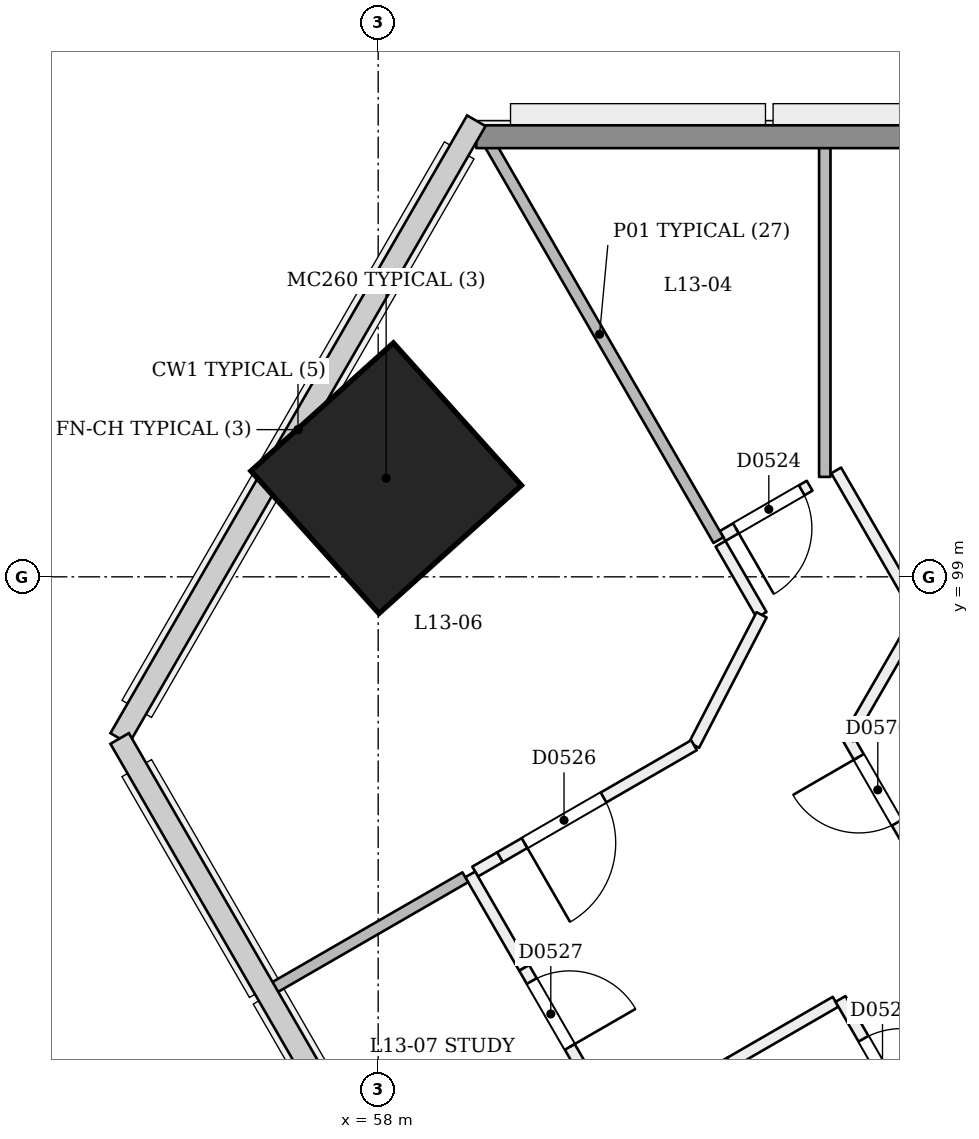
"""IFC4 building model, lengths in metres.
Left out: names, types, materials, properties, quantities, classifications, styles, units other than length and angle.
Written with IfcOpenShell. Run it as: python <this file> out.ifc"""

import sys

from ifc_helpers import new_model, si_unit, direction, frame, frame_2d, origin, origin_2d, place, context, subcontext, project, spatial, rectangle, extrude, element, fill, save


model = new_model("IFC4")
c1 = context("Model", 3, precision=1e-05, world=origin(), true_north=direction((0.0, 1.0)))
c2 = subcontext(c1, "Body", "Model", "MODEL_VIEW")
j1 = project(units=[si_unit("LENGTHUNIT", "METRE"), si_unit("PLANEANGLEUNIT", "RADIAN")], contexts=[c1])
p1 = place(None, origin())
s1 = spatial("IfcSite", under=j1, at=p1, CompositionType="ELEMENT")
p2 = place(p1, origin())
s2 = spatial("IfcBuilding", under=s1, at=p2, CompositionType="ELEMENT")
p3 = place(p2, frame((0.0, 0.0, 55.8)))
s3 = spatial("IfcBuildingStorey", under=s2, at=p3, CompositionType="ELEMENT", Elevation=55.8)
p4 = place(p3, frame((58.071, 100.287, 0.0), z_axis=(0.028403739082, 0.009219352065, 0.999554016126), x_axis=(-0.865127356404, 0.501154864759, 0.019961431043)))
e1 = element("IfcColumn", 1, at=p4, inside=s3, PredefinedType="COLUMN", context=c2, shape_type="SweptSolid", body=[
    extrude(rectangle(XDim=2.52, YDim=2.52, at=origin_2d()), origin(), (0.0, 0.0, 1.0), 3.602),
])
p5 = place(p3, frame((63.676, 100.198, 0.0), z_axis=(0.0, 0.0, 1.0), x_axis=(-0.865994851461, -0.500052914442, 0.0)))
e2 = element("IfcWall", 2, at=p5, inside=s3, PredefinedType="PARTITIONING", context=c2, shape_type="SweptSolid", body=[
    extrude(rectangle(XDim=1.322, YDim=0.15, at=frame_2d((0.661, 0.0))), origin(), (0.0, 0.0, 1.0), 3.1),
])
p6 = place(p5, frame((0.12, 0.0, 0.0)))
e3 = element("IfcOpeningElement", 3, at=p6, cuts=e2, PredefinedType="OPENING", context=c2, shape_type="SweptSolid", body=[
    extrude(rectangle(XDim=1.0, YDim=2.1, at=frame_2d((0.5, 1.05))), frame((0.0, 0.085, 0.0), z_axis=(0.0, -1.0, 0.0), x_axis=(1.0, 0.0, 0.0)), (0.0, 0.0, 1.0), 0.171),
])
p7 = place(p3, frame((62.504, 99.435, 0.0), z_axis=(0.0, 0.0, 1.0), x_axis=(0.499957341738, -0.866050031143, 0.0)))
e4 = element("IfcWall", 4, at=p7, inside=s3, PredefinedType="PARTITIONING", context=c2, shape_type="SweptSolid", body=[
    extrude(rectangle(XDim=1.08, YDim=0.15, at=frame_2d((0.54, 0.0))), origin(), (0.0, 0.0, 1.0), 3.1),
])
p8 = place(p3, frame((63.044, 98.5, 0.0), z_axis=(0.0, 0.0, 1.0), x_axis=(-0.459959252293, -0.887940024005, 0.0)))
e5 = element("IfcWall", 5, at=p8, inside=s3, PredefinedType="PARTITIONING", context=c2, shape_type="SweptSolid", body=[
    extrude(rectangle(XDim=1.932, YDim=0.15, at=frame_2d((0.966, 0.0))), origin(), (0.0, 0.0, 1.0), 3.1),
])
p9 = place(p3, frame((62.155, 96.785, 0.0), z_axis=(0.0, 0.0, 1.0), x_axis=(-0.866033953121, -0.499985191823, 0.0)))
e6 = element("IfcWall", 6, at=p9, inside=s3, PredefinedType="PARTITIONING", context=c2, shape_type="SweptSolid", body=[
    extrude(rectangle(XDim=2.949, YDim=0.15, at=frame_2d((1.475, 0.0))), origin(), (0.0, 0.0, 1.0), 3.1),
])
p10 = place(p9, frame((1.375, 0.0, 0.0)))
e7 = element("IfcOpeningElement", 7, at=p10, cuts=e6, PredefinedType="OPENING", context=c2, shape_type="SweptSolid", body=[
    extrude(rectangle(XDim=1.2, YDim=2.1, at=frame_2d((0.6, 1.05))), frame((0.0, 0.085, 0.0), z_axis=(0.0, -1.0, 0.0), x_axis=(1.0, 0.0, 0.0)), (0.0, 0.0, 1.0), 0.171),
])
p11 = place(p3, frame((59.601, 95.31, 0.0), z_axis=(0.0, 0.0, 1.0), x_axis=(-0.865752432539, -0.500472502294, 0.0)))
e8 = element("IfcWall", 8, at=p11, inside=s3, PredefinedType="PARTITIONING", context=c2, shape_type="SweptSolid", body=[
    extrude(rectangle(XDim=0.376, YDim=0.15, at=frame_2d((0.188, 0.0))), origin(), (0.0, 0.0, 1.0), 2.6),
])
p12 = place(p3, frame((59.211, 95.085, 0.0), z_axis=(0.0, 0.0, 1.0), x_axis=(0.500114325761, -0.865959387713, 0.0)))
e9 = element("IfcWall", 9, at=p12, inside=s3, PredefinedType="PARTITIONING", context=c2, shape_type="SweptSolid", body=[
    extrude(rectangle(XDim=1.42, YDim=0.15, at=frame_2d((0.71, 0.0))), origin(), (0.0, 0.0, 1.0), 2.6),
])
p13 = place(p3, frame((59.921, 93.855, 0.0), z_axis=(0.0, 0.0, 1.0), x_axis=(0.499967270532, -0.866044299327, 0.0)))
e10 = element("IfcWall", 10, at=p13, inside=s3, PredefinedType="PARTITIONING", context=c2, shape_type="SweptSolid", body=[
    extrude(rectangle(XDim=2.36, YDim=0.15, at=frame_2d((1.18, 0.0))), origin(), (0.0, 0.0, 1.0), 3.1),
])
p14 = place(p13, frame((0.2, 0.0, 0.0)))
e11 = element("IfcOpeningElement", 11, at=p14, cuts=e10, PredefinedType="OPENING", context=c2, shape_type="SweptSolid", body=[
    extrude(rectangle(XDim=1.0, YDim=2.1, at=frame_2d((0.5, 1.05))), frame((0.0, 0.085, 0.0), z_axis=(0.0, -1.0, 0.0), x_axis=(1.0, 0.0, 0.0)), (0.0, 0.0, 1.0), 0.171),
])
p15 = place(p3, frame((62.628, 92.607, 0.0), z_axis=(0.0, 0.0, 1.0), x_axis=(0.866015857963, 0.500016533484, 0.0)))
e12 = element("IfcWall", 12, at=p15, inside=s3, PredefinedType="PARTITIONING", context=c2, shape_type="SweptSolid", body=[
    extrude(rectangle(XDim=1.605, YDim=0.15, at=frame_2d((0.802, 0.0))), origin(), (0.0, 0.0, 1.0), 3.1),
])
p16 = place(p3, frame((64.083, 93.447, 0.0), z_axis=(0.0, 0.0, 1.0), x_axis=(0.5000018851, -0.866024315419, 0.0)))
e13 = element("IfcWall", 13, at=p16, inside=s3, PredefinedType="PARTITIONING", context=c2, shape_type="SweptSolid", body=[
    extrude(rectangle(XDim=36.0, YDim=0.15, at=frame_2d((18.0, 0.0))), origin(), (0.0, 0.0, 1.0), 2.7),
])
p17 = place(p16, frame((0.605, 0.0, 0.0)))
e14 = element("IfcOpeningElement", 14, at=p17, cuts=e13, PredefinedType="OPENING", context=c2, shape_type="SweptSolid", body=[
    extrude(rectangle(XDim=1.0, YDim=2.1, at=frame_2d((0.5, 1.05))), frame((0.0, 0.085, 0.0), z_axis=(0.0, -1.0, 0.0), x_axis=(1.0, 0.0, 0.0)), (0.0, 0.0, 1.0), 0.171),
])
p18 = place(p16, frame((7.28, 0.0, 0.0)))
e15 = element("IfcOpeningElement", 15, at=p18, cuts=e13, PredefinedType="OPENING", context=c2, shape_type="SweptSolid", body=[
    extrude(rectangle(XDim=1.0, YDim=2.1, at=frame_2d((0.5, 1.05))), frame((0.0, 0.085, 0.0), z_axis=(0.0, -1.0, 0.0), x_axis=(1.0, 0.0, 0.0)), (0.0, 0.0, 1.0), 0.171),
])
p19 = place(p16, frame((9.72, 0.0, 0.0)))
e16 = element("IfcOpeningElement", 16, at=p19, cuts=e13, PredefinedType="OPENING", context=c2, shape_type="SweptSolid", body=[
    extrude(rectangle(XDim=1.0, YDim=2.1, at=frame_2d((0.5, 1.05))), frame((0.0, 0.085, 0.0), z_axis=(0.0, -1.0, 0.0), x_axis=(1.0, 0.0, 0.0)), (0.0, 0.0, 1.0), 0.171),
])
p20 = place(p16, frame((16.395, 0.0, 0.0)))
e17 = element("IfcOpeningElement", 17, at=p20, cuts=e13, PredefinedType="OPENING", context=c2, shape_type="SweptSolid", body=[
    extrude(rectangle(XDim=1.0, YDim=2.1, at=frame_2d((0.5, 1.05))), frame((0.0, 0.085, 0.0), z_axis=(0.0, -1.0, 0.0), x_axis=(1.0, 0.0, 0.0)), (0.0, 0.0, 1.0), 0.171),
])
p21 = place(p16, frame((18.72, 0.0, 0.0)))
e18 = element("IfcOpeningElement", 18, at=p21, cuts=e13, PredefinedType="OPENING", context=c2, shape_type="SweptSolid", body=[
    extrude(rectangle(XDim=1.0, YDim=2.1, at=frame_2d((0.5, 1.05))), frame((0.0, 0.085, 0.0), z_axis=(0.0, -1.0, 0.0), x_axis=(1.0, 0.0, 0.0)), (0.0, 0.0, 1.0), 0.171),
])
p22 = place(p16, frame((25.395, 0.0, 0.0)))
e19 = element("IfcOpeningElement", 19, at=p22, cuts=e13, PredefinedType="OPENING", context=c2, shape_type="SweptSolid", body=[
    extrude(rectangle(XDim=1.0, YDim=2.1, at=frame_2d((0.5, 1.05))), frame((0.0, 0.085, 0.0), z_axis=(0.0, -1.0, 0.0), x_axis=(1.0, 0.0, 0.0)), (0.0, 0.0, 1.0), 0.171),
])
p23 = place(p16, frame((27.605, 0.0, 0.0)))
e20 = element("IfcOpeningElement", 20, at=p23, cuts=e13, PredefinedType="OPENING", context=c2, shape_type="SweptSolid", body=[
    extrude(rectangle(XDim=1.0, YDim=2.1, at=frame_2d((0.5, 1.05))), frame((0.0, 0.085, 0.0), z_axis=(0.0, -1.0, 0.0), x_axis=(1.0, 0.0, 0.0)), (0.0, 0.0, 1.0), 0.171),
])
p24 = place(p16, frame((34.28, 0.0, 0.0)))
e21 = element("IfcOpeningElement", 21, at=p24, cuts=e13, PredefinedType="OPENING", context=c2, shape_type="SweptSolid", body=[
    extrude(rectangle(XDim=1.0, YDim=2.1, at=frame_2d((0.5, 1.05))), frame((0.0, 0.085, 0.0), z_axis=(0.0, -1.0, 0.0), x_axis=(1.0, 0.0, 0.0)), (0.0, 0.0, 1.0), 0.171),
])
p25 = place(p3, frame((66.765, 92.4, 0.0), z_axis=(0.0, 0.0, 1.0), x_axis=(-0.499992497538, 0.86602973529, 0.0)))
e22 = element("IfcWall", 22, at=p25, inside=s3, PredefinedType="PARTITIONING", context=c2, shape_type="SweptSolid", body=[
    extrude(rectangle(XDim=5.165, YDim=0.15, at=frame_2d((2.583, 0.0))), origin(), (0.0, 0.0, 1.0), 3.1),
])
p26 = place(p25, frame((3.885, 0.0, 0.0)))
e23 = element("IfcOpeningElement", 23, at=p26, cuts=e22, PredefinedType="OPENING", context=c2, shape_type="SweptSolid", body=[
    extrude(rectangle(XDim=1.0, YDim=2.1, at=frame_2d((0.5, 1.05))), frame((0.0, 0.085, 0.0), z_axis=(0.0, -1.0, 0.0), x_axis=(1.0, 0.0, 0.0)), (0.0, 0.0, 1.0), 0.171),
])
p27 = place(p3, frame((64.183, 96.873, 0.0), z_axis=(0.0, 0.0, 1.0), x_axis=(0.500052415518, 0.865995139556, 0.0)))
e24 = element("IfcWall", 24, at=p27, inside=s3, PredefinedType="PARTITIONING", context=c2, shape_type="SweptSolid", body=[
    extrude(rectangle(XDim=1.879, YDim=0.15, at=frame_2d((0.939, 0.0))), origin(), (0.0, 0.0, 1.0), 3.1),
])
p28 = place(p3, frame((65.122, 98.5, 0.0), z_axis=(0.0, 0.0, 1.0), x_axis=(-0.500005024956, 0.866022502605, 0.0)))
e25 = element("IfcWall", 25, at=p28, inside=s3, PredefinedType="PARTITIONING", context=c2, shape_type="SweptSolid", body=[
    extrude(rectangle(XDim=2.194, YDim=0.15, at=frame_2d((1.097, 0.0))), origin(), (0.0, 0.0, 1.0), 3.1),
])
p29 = place(p3, frame((59.349, 104.9, 0.0), z_axis=(0.0, 0.0, 1.0), x_axis=(0.500005118993, -0.866022448312, 0.0)))
e26 = element("IfcWall", 26, at=p29, inside=s3, PredefinedType="PARTITIONING", context=c2, shape_type="SweptSolid", body=[
    extrude(rectangle(XDim=6.255, YDim=0.15, at=frame_2d((3.128, 0.0))), origin(), (0.0, 0.0, 1.0), 2.6),
])
p30 = place(p3, frame((63.875, 100.315, 0.0), z_axis=(0.0, 0.0, 1.0), x_axis=(0.0, 1.0, 0.0)))
e27 = element("IfcWall", 27, at=p30, inside=s3, PredefinedType="PARTITIONING", context=c2, shape_type="SweptSolid", body=[
    extrude(rectangle(XDim=4.585, YDim=0.15, at=frame_2d((2.292, 0.0))), origin(), (0.0, 0.0, 1.0), 2.6),
])
p31 = place(p3, frame((56.595, 93.575, 0.0), z_axis=(0.0, 0.0, 1.0), x_axis=(0.866010265175, 0.500026219923, 0.0)))
e28 = element("IfcWall", 28, at=p31, inside=s3, PredefinedType="PARTITIONING", context=c2, shape_type="SweptSolid", body=[
    extrude(rectangle(XDim=2.945, YDim=0.15, at=frame_2d((1.473, 0.0))), origin(), (0.0, 0.0, 1.0), 2.6),
])
p32 = place(p3, frame((58.522, 90.237, 0.0), z_axis=(0.0, 0.0, 1.0), x_axis=(0.866028632512, 0.499994407638, 0.0)))
e29 = element("IfcWall", 29, at=p32, inside=s3, PredefinedType="PARTITIONING", context=c2, shape_type="SweptSolid", body=[
    extrude(rectangle(XDim=4.74, YDim=0.15, at=frame_2d((2.37, 0.0))), origin(), (0.0, 0.0, 1.0), 2.6),
])
p33 = place(p3, frame((59.291, 104.79, 0.0), z_axis=(0.0, 0.0, 1.0), x_axis=(1.0, 0.0, 0.0)))
e30 = element("IfcWall", 30, at=p33, inside=s3, PredefinedType="SOLIDWALL", context=c2, shape_type="SweptSolid", body=[
    extrude(rectangle(XDim=51.418, YDim=0.3, at=frame_2d((25.709, 0.0))), origin(), (0.0, 0.0, 1.0), 2.6),
])
p34 = place(p6, origin())
e31 = element("IfcDoor", 31, at=p34, inside=s3, OperationType="SINGLE_SWING_RIGHT", PredefinedType="NOTDEFINED", context=c2, shape_type="SweptSolid", body=[
    extrude(rectangle(XDim=1.0, YDim=2.1, at=frame_2d((0.5, 1.05))), frame((0.0, 0.025, 0.0), z_axis=(0.0, -1.0, 0.0), x_axis=(1.0, 0.0, 0.0)), (0.0, 0.0, 1.0), 0.05),
])
fill(e3, e31)
p35 = place(p10, origin())
e32 = element("IfcDoor", 32, at=p35, inside=s3, OperationType="SINGLE_SWING_RIGHT", PredefinedType="NOTDEFINED", context=c2, shape_type="SweptSolid", body=[
    extrude(rectangle(XDim=1.2, YDim=2.1, at=frame_2d((0.6, 1.05))), frame((0.0, 0.025, 0.0), z_axis=(0.0, -1.0, 0.0), x_axis=(1.0, 0.0, 0.0)), (0.0, 0.0, 1.0), 0.05),
])
fill(e7, e32)
p36 = place(p14, origin())
e33 = element("IfcDoor", 33, at=p36, inside=s3, OperationType="SINGLE_SWING_RIGHT", PredefinedType="NOTDEFINED", context=c2, shape_type="SweptSolid", body=[
    extrude(rectangle(XDim=1.0, YDim=2.1, at=frame_2d((0.5, 1.05))), frame((0.0, 0.025, 0.0), z_axis=(0.0, -1.0, 0.0), x_axis=(1.0, 0.0, 0.0)), (0.0, 0.0, 1.0), 0.05),
])
fill(e11, e33)
p37 = place(p17, origin())
e34 = element("IfcDoor", 34, at=p37, inside=s3, OperationType="SINGLE_SWING_RIGHT", PredefinedType="NOTDEFINED", context=c2, shape_type="SweptSolid", body=[
    extrude(rectangle(XDim=1.0, YDim=2.1, at=frame_2d((0.5, 1.05))), frame((0.0, 0.025, 0.0), z_axis=(0.0, -1.0, 0.0), x_axis=(1.0, 0.0, 0.0)), (0.0, 0.0, 1.0), 0.05),
])
fill(e14, e34)
p38 = place(p26, origin())
e35 = element("IfcDoor", 35, at=p38, inside=s3, OperationType="SINGLE_SWING_RIGHT", PredefinedType="NOTDEFINED", context=c2, shape_type="SweptSolid", body=[
    extrude(rectangle(XDim=1.0, YDim=2.1, at=frame_2d((0.5, 1.05))), frame((0.0, 0.025, 0.0), z_axis=(0.0, -1.0, 0.0), x_axis=(1.0, 0.0, 0.0)), (0.0, 0.0, 1.0), 0.05),
])
fill(e23, e35)
save(model, sys.argv[1])
